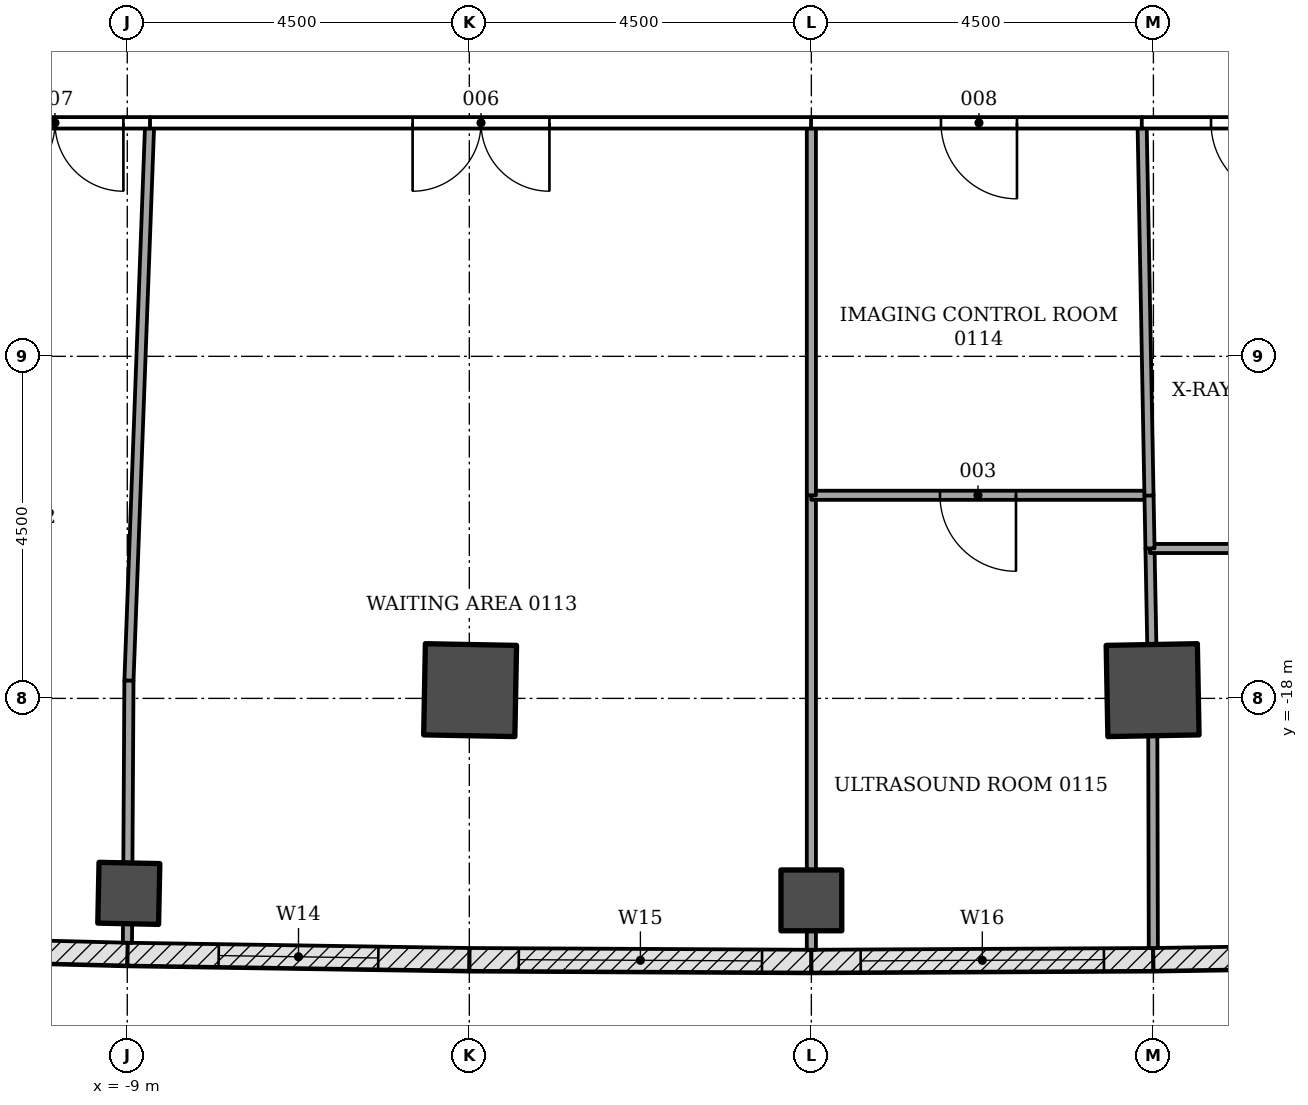
"""IFC4 building model, lengths in metres.
Left out: names, types, materials, properties, quantities, classifications, styles, units other than length and angle.
Written with IfcOpenShell. Run it as: python <this file> out.ifc"""

import sys

from ifc_helpers import new_model, si_unit, direction, frame, frame_2d, origin, origin_2d, place, context, subcontext, project, spatial, rectangle, extrude, element, fill, save


model = new_model("IFC4")
c1 = context("Model", 3, precision=1e-05, world=origin(), true_north=direction((0.0, 1.0)))
c2 = subcontext(c1, "Body", "Model", "MODEL_VIEW")
j1 = project(units=[si_unit("LENGTHUNIT", "METRE"), si_unit("PLANEANGLEUNIT", "RADIAN")], contexts=[c1])
p1 = place(None, origin())
s1 = spatial("IfcSite", under=j1, at=p1, CompositionType="ELEMENT")
p2 = place(p1, origin())
s2 = spatial("IfcBuilding", under=s1, at=p2, CompositionType="ELEMENT")
p3 = place(p2, frame((0.0, 0.0, 6.0)))
s3 = spatial("IfcBuildingStorey", under=s2, at=p3, CompositionType="ELEMENT", Elevation=6.0)
for number, where, z_axis, x_axis in (
    (1, (-4.49, -17.892, -0.25), (0.0, 0.0, 1.0), (-0.019, -1.0, 0.0)),
    (2, (4.49, -17.892, -0.25), (0.0, 0.0, 1.0), (0.019, -1.0, 0.0)),
):
    element("IfcColumn", number, at=place(p3, frame(where, z_axis=z_axis, x_axis=x_axis)), inside=s3, PredefinedType="COLUMN", context=c2, shape_type="SweptSolid", body=[
        extrude(rectangle(XDim=1.2, YDim=1.2, at=origin_2d()), origin(), (0.0, 0.0, 1.0), 4.5),
    ])
for number, where, z_axis, x_axis in (
    (3, (-8.98, -20.565, -0.25), (0.0, 0.0, 1.0), (-0.021, -1.0, 0.0)),
    (4, (0.0, -20.657, -0.25), (0.0, 0.0, 1.0), (0.0, -1.0, 0.0)),
):
    element("IfcColumn", number, at=place(p3, frame(where, z_axis=z_axis, x_axis=x_axis)), inside=s3, PredefinedType="COLUMN", context=c2, shape_type="SweptSolid", body=[
        extrude(rectangle(XDim=0.8, YDim=0.8, at=origin_2d()), origin(), (0.0, 0.0, 1.0), 4.5),
    ])
p4 = place(p3, frame((-9.922, -5.728, -0.25), z_axis=(0.0, 0.0, 1.0), x_axis=(-0.866028046028, -0.499995423472, 0.0)))
e5 = element("IfcWall", 5, at=p4, inside=s3, PredefinedType="SHEAR", context=c2, shape_type="SweptSolid", body=[
    extrude(rectangle(XDim=14.633, YDim=0.9, at=frame_2d((7.316, 0.0))), origin(), (0.0, 0.0, 1.0), 4.5),
])
p5 = place(p4, frame((7.35, 0.0, 0.25)))
e6 = element("IfcOpeningElement", 6, at=p5, cuts=e5, PredefinedType="OPENING", context=c2, shape_type="SweptSolid", body=[
    extrude(rectangle(XDim=1.5, YDim=2.1, at=frame_2d((0.75, 1.05))), frame((0.0, 0.46, 0.0), z_axis=(0.0, -1.0, 0.0), x_axis=(1.0, 0.0, 0.0)), (0.0, 0.0, 1.0), 0.92),
])
p6 = place(p3, frame((-8.998, -21.365, 0.0), z_axis=(0.0, 0.0, 1.0), x_axis=(-0.999671466587, 0.025631209312, 0.0)))
e7 = element("IfcWall", 7, at=p6, inside=s3, PredefinedType="NOTDEFINED", context=c2, shape_type="SweptSolid", body=[
    extrude(rectangle(XDim=4.496, YDim=0.3, at=frame_2d((2.248, 0.0))), origin(), (0.0, 0.0, 1.0), 4.25),
])
p7 = place(p6, frame((1.048, 0.0, 0.9)))
e8 = element("IfcOpeningElement", 8, at=p7, cuts=e7, PredefinedType="OPENING", context=c2, shape_type="SweptSolid", body=[
    extrude(rectangle(XDim=2.4, YDim=2.4, at=frame_2d((1.2, 1.2))), frame((0.0, 0.16, 0.0), z_axis=(0.0, -1.0, 0.0), x_axis=(1.0, 0.0, 0.0)), (0.0, 0.0, 1.0), 0.32),
])
p8 = place(p3, frame((-4.5, -21.434, 0.0), z_axis=(0.0, 0.0, 1.0), x_axis=(-0.999881921814, 0.015366926462, 0.0)))
e9 = element("IfcWall", 9, at=p8, inside=s3, PredefinedType="NOTDEFINED", context=c2, shape_type="SweptSolid", body=[
    extrude(rectangle(XDim=4.496, YDim=0.3, at=frame_2d((2.248, 0.0))), origin(), (0.0, 0.0, 1.0), 4.25),
])
p9 = place(p8, frame((1.198, 0.0, 0.8)))
e10 = element("IfcOpeningElement", 10, at=p9, cuts=e9, PredefinedType="OPENING", context=c2, shape_type="SweptSolid", body=[
    extrude(rectangle(XDim=2.1, YDim=3.0, at=frame_2d((1.05, 1.5))), frame((0.0, 0.16, 0.0), z_axis=(0.0, -1.0, 0.0), x_axis=(1.0, 0.0, 0.0)), (0.0, 0.0, 1.0), 0.32),
])
p10 = place(p3, frame((-0.001, -21.457, 0.0), z_axis=(0.0, 0.0, 1.0), x_axis=(-0.999986693461, 0.005158769258, 0.0)))
e11 = element("IfcWall", 11, at=p10, inside=s3, PredefinedType="NOTDEFINED", context=c2, shape_type="SweptSolid", body=[
    extrude(rectangle(XDim=4.496, YDim=0.3, at=frame_2d((2.248, 0.0))), origin(), (0.0, 0.0, 1.0), 4.25),
])
p11 = place(p10, frame((0.648, 0.0, 0.8)))
e12 = element("IfcOpeningElement", 12, at=p11, cuts=e11, PredefinedType="OPENING", context=c2, shape_type="SweptSolid", body=[
    extrude(rectangle(XDim=3.2, YDim=2.7, at=frame_2d((1.6, 1.35))), frame((0.0, 0.16, 0.0), z_axis=(0.0, -1.0, 0.0), x_axis=(1.0, 0.0, 0.0)), (0.0, 0.0, 1.0), 0.32),
])
p12 = place(p3, frame((4.497, -21.434, 0.0), z_axis=(0.0, 0.0, 1.0), x_axis=(-0.999986693461, -0.005158769258, 0.0)))
e13 = element("IfcWall", 13, at=p12, inside=s3, PredefinedType="NOTDEFINED", context=c2, shape_type="SweptSolid", body=[
    extrude(rectangle(XDim=4.496, YDim=0.3, at=frame_2d((2.248, 0.0))), origin(), (0.0, 0.0, 1.0), 4.25),
])
p13 = place(p12, frame((0.648, 0.0, 0.8)))
e14 = element("IfcOpeningElement", 14, at=p13, cuts=e13, PredefinedType="OPENING", context=c2, shape_type="SweptSolid", body=[
    extrude(rectangle(XDim=3.2, YDim=2.7, at=frame_2d((1.6, 1.35))), frame((0.0, 0.16, 0.0), z_axis=(0.0, -1.0, 0.0), x_axis=(1.0, 0.0, 0.0)), (0.0, 0.0, 1.0), 0.32),
])
p14 = place(p3, frame((8.995, -21.365, 0.0), z_axis=(0.0, 0.0, 1.0), x_axis=(-0.999881921814, -0.015366926462, 0.0)))
e15 = element("IfcWall", 15, at=p14, inside=s3, PredefinedType="NOTDEFINED", context=c2, shape_type="SweptSolid", body=[
    extrude(rectangle(XDim=4.496, YDim=0.3, at=frame_2d((2.248, 0.0))), origin(), (0.0, 0.0, 1.0), 4.25),
])
p15 = place(p14, frame((1.198, 0.0, 0.8)))
e16 = element("IfcOpeningElement", 16, at=p15, cuts=e15, PredefinedType="OPENING", context=c2, shape_type="SweptSolid", body=[
    extrude(rectangle(XDim=2.1, YDim=3.0, at=frame_2d((1.05, 1.5))), frame((0.0, 0.16, 0.0), z_axis=(0.0, -1.0, 0.0), x_axis=(1.0, 0.0, 0.0)), (0.0, 0.0, 1.0), 0.32),
])
p16 = place(p3, frame((4.455, -16.024, 0.0), z_axis=(0.0, 0.0, 1.0), x_axis=(0.018879100933, -0.999821773892, 0.0)))
e17 = element("IfcWall", 17, at=p16, inside=s3, PredefinedType="PARTITIONING", context=c2, shape_type="SweptSolid", body=[
    extrude(rectangle(XDim=1.267, YDim=0.12, at=frame_2d((0.634, 0.0))), origin(), (0.0, 0.0, 1.0), 3.638),
])
p17 = place(p3, frame((4.492, -18.492, 0.0), z_axis=(0.0, 0.0, 1.0), x_axis=(0.002535843543, -0.999996784744, 0.0)))
e18 = element("IfcWall", 18, at=p17, inside=s3, PredefinedType="PARTITIONING", context=c2, shape_type="SweptSolid", body=[
    extrude(rectangle(XDim=2.792, YDim=0.12, at=frame_2d((1.396, 0.0))), origin(), (0.0, 0.0, 1.0), 3.633),
])
p18 = place(p3, frame((8.913, -16.028, 0.0), z_axis=(0.0, 0.0, 1.0), x_axis=(-1.0, 0.0, 0.0)))
e19 = element("IfcWall", 19, at=p18, inside=s3, PredefinedType="PARTITIONING", context=c2, shape_type="SweptSolid", body=[
    extrude(rectangle(XDim=4.458, YDim=0.12, at=frame_2d((2.229, 0.0))), origin(), (0.0, 0.0, 1.0), 3.638),
])
p19 = place(p18, frame((1.75, 0.0, 0.0)))
e20 = element("IfcOpeningElement", 20, at=p19, cuts=e19, PredefinedType="OPENING", context=c2, shape_type="SweptSolid", body=[
    extrude(rectangle(XDim=1.0, YDim=2.1, at=frame_2d((0.5, 1.05))), frame((0.0, 0.07, 0.0), z_axis=(0.0, -1.0, 0.0), x_axis=(1.0, 0.0, 0.0)), (0.0, 0.0, 1.0), 0.14),
])
p20 = place(p3, frame((0.0, -21.057, 0.0), z_axis=(0.0, 0.0, 1.0), x_axis=(0.0, -1.0, 0.0)))
e21 = element("IfcWall", 21, at=p20, inside=s3, PredefinedType="PARTITIONING", context=c2, shape_type="SweptSolid", body=[
    extrude(rectangle(XDim=0.25, YDim=0.12, at=frame_2d((0.125, 0.0))), origin(), (0.0, 0.0, 1.0), 4.25),
])
p21 = place(p3, frame((0.0, -15.324, 0.0), z_axis=(0.0, 0.0, 1.0), x_axis=(0.0, -1.0, 0.0)))
e22 = element("IfcWall", 22, at=p21, inside=s3, PredefinedType="PARTITIONING", context=c2, shape_type="SweptSolid", body=[
    extrude(rectangle(XDim=4.933, YDim=0.12, at=frame_2d((2.467, 0.0))), origin(), (0.0, 0.0, 1.0), 3.638),
])
p22 = place(p3, frame((4.442, -15.328, 0.0), z_axis=(0.0, 0.0, 1.0), x_axis=(-1.0, 0.0, 0.0)))
e23 = element("IfcWall", 23, at=p22, inside=s3, PredefinedType="PARTITIONING", context=c2, shape_type="SweptSolid", body=[
    extrude(rectangle(XDim=4.442, YDim=0.12, at=frame_2d((2.221, 0.0))), origin(), (0.0, 0.0, 1.0), 3.638),
])
p23 = place(p22, frame((1.75, 0.0, 0.0)))
e24 = element("IfcOpeningElement", 24, at=p23, cuts=e23, PredefinedType="OPENING", context=c2, shape_type="SweptSolid", body=[
    extrude(rectangle(XDim=1.0, YDim=2.1, at=frame_2d((0.5, 1.05))), frame((0.0, 0.07, 0.0), z_axis=(0.0, -1.0, 0.0), x_axis=(1.0, 0.0, 0.0)), (0.0, 0.0, 1.0), 0.14),
])
p24 = place(p3, frame((4.455, -16.027, 0.0), z_axis=(0.0, 0.0, 1.0), x_axis=(-0.01874670497, 0.999824265085, 0.0)))
e25 = element("IfcWall", 25, at=p24, inside=s3, PredefinedType="PARTITIONING", context=c2, shape_type="SweptSolid", body=[
    extrude(rectangle(XDim=0.703, YDim=0.12, at=frame_2d((0.352, 0.0))), origin(), (0.0, 0.0, 1.0), 3.638),
])
p25 = place(p3, frame((-8.996, -20.965, 0.0), z_axis=(0.0, 0.0, 1.0), x_axis=(-0.007812261592, -0.999969483819, 0.0)))
e26 = element("IfcWall", 26, at=p25, inside=s3, PredefinedType="PARTITIONING", context=c2, shape_type="SweptSolid", body=[
    extrude(rectangle(XDim=0.25, YDim=0.12, at=frame_2d((0.125, 0.0))), origin(), (0.0, 0.0, 1.0), 4.25),
])
p26 = place(p3, frame((-8.705, -10.429, 0.0), z_axis=(0.0, 0.0, 1.0), x_axis=(-0.037170289837, -0.999308945999, 0.0)))
e27 = element("IfcWall", 27, at=p26, inside=s3, PredefinedType="PARTITIONING", context=c2, shape_type="SweptSolid", body=[
    extrude(rectangle(XDim=7.343, YDim=0.12, at=frame_2d((3.672, 0.0))), origin(), (0.0, 0.0, 1.0), 3.638),
])
p27 = place(p3, frame((-8.978, -17.767, 0.0), z_axis=(0.0, 0.0, 1.0), x_axis=(-0.005803200997, -0.999983161287, 0.0)))
e28 = element("IfcWall", 28, at=p27, inside=s3, PredefinedType="PARTITIONING", context=c2, shape_type="SweptSolid", body=[
    extrude(rectangle(XDim=2.398, YDim=0.12, at=frame_2d((1.199, 0.0))), origin(), (0.0, 0.0, 1.0), 3.638),
])
p28 = place(p3, frame((0.0, -15.328, 0.0), z_axis=(0.0, 0.0, 1.0), x_axis=(0.0, 1.0, 0.0)))
e29 = element("IfcWall", 29, at=p28, inside=s3, PredefinedType="PARTITIONING", context=c2, shape_type="SweptSolid", body=[
    extrude(rectangle(XDim=4.9, YDim=0.12, at=frame_2d((2.45, 0.0))), origin(), (0.0, 0.0, 1.0), 3.638),
])
p29 = place(p3, frame((0.004, -10.428, 0.0), z_axis=(0.0, 0.0, 1.0), x_axis=(-1.0, 0.0, 0.0)))
e30 = element("IfcWall", 30, at=p29, inside=s3, PredefinedType="PARTITIONING", context=c2, shape_type="SweptSolid", body=[
    extrude(rectangle(XDim=8.713, YDim=0.15, at=frame_2d((4.356, 0.0))), origin(), (0.0, 0.0, 1.0), 3.638),
])
p30 = place(p29, frame((3.45, 0.0, 0.0)))
e31 = element("IfcOpeningElement", 31, at=p30, cuts=e30, PredefinedType="OPENING", context=c2, shape_type="SweptSolid", body=[
    extrude(rectangle(XDim=1.8, YDim=2.1, at=frame_2d((0.9, 1.05))), frame((0.0, 0.085, 0.0), z_axis=(0.0, -1.0, 0.0), x_axis=(1.0, 0.0, 0.0)), (0.0, 0.0, 1.0), 0.17),
])
p31 = place(p3, frame((-8.701, -10.428, 0.0), z_axis=(0.0, 0.0, 1.0), x_axis=(-1.0, 0.0, 0.0)))
e32 = element("IfcWall", 32, at=p31, inside=s3, PredefinedType="PARTITIONING", context=c2, shape_type="SweptSolid", body=[
    extrude(rectangle(XDim=2.548, YDim=0.15, at=frame_2d((1.274, 0.0))), origin(), (0.0, 0.0, 1.0), 3.638),
])
p32 = place(p31, frame((0.35, 0.0, 0.0)))
e33 = element("IfcOpeningElement", 33, at=p32, cuts=e32, PredefinedType="OPENING", context=c2, shape_type="SweptSolid", body=[
    extrude(rectangle(XDim=1.8, YDim=2.1, at=frame_2d((0.9, 1.05))), frame((0.0, 0.085, 0.0), z_axis=(0.0, -1.0, 0.0), x_axis=(1.0, 0.0, 0.0)), (0.0, 0.0, 1.0), 0.17),
])
p33 = place(p3, frame((4.442, -15.332, 0.0), z_axis=(0.0, 0.0, 1.0), x_axis=(-0.018519952131, 0.999828490979, 0.0)))
e34 = element("IfcWall", 34, at=p33, inside=s3, PredefinedType="PARTITIONING", context=c2, shape_type="SweptSolid", body=[
    extrude(rectangle(XDim=4.904, YDim=0.12, at=frame_2d((2.452, 0.0))), origin(), (0.0, 0.0, 1.0), 3.638),
])
p34 = place(p3, frame((4.355, -10.428, 0.0), z_axis=(0.0, 0.0, 1.0), x_axis=(-1.0, 0.0, 0.0)))
e35 = element("IfcWall", 35, at=p34, inside=s3, PredefinedType="PARTITIONING", context=c2, shape_type="SweptSolid", body=[
    extrude(rectangle(XDim=4.359, YDim=0.15, at=frame_2d((2.179, 0.0))), origin(), (0.0, 0.0, 1.0), 3.638),
])
p35 = place(p34, frame((1.65, 0.0, 0.0)))
e36 = element("IfcOpeningElement", 36, at=p35, cuts=e35, PredefinedType="OPENING", context=c2, shape_type="SweptSolid", body=[
    extrude(rectangle(XDim=1.0, YDim=2.1, at=frame_2d((0.5, 1.05))), frame((0.0, 0.085, 0.0), z_axis=(0.0, -1.0, 0.0), x_axis=(1.0, 0.0, 0.0)), (0.0, 0.0, 1.0), 0.17),
])
p36 = place(p3, frame((7.208, -10.428, 0.0), z_axis=(0.0, 0.0, 1.0), x_axis=(-1.0, 0.0, 0.0)))
e37 = element("IfcWall", 37, at=p36, inside=s3, PredefinedType="PARTITIONING", context=c2, shape_type="SweptSolid", body=[
    extrude(rectangle(XDim=2.861, YDim=0.15, at=frame_2d((1.431, 0.0))), origin(), (0.0, 0.0, 1.0), 3.638),
])
p37 = place(p36, frame((0.95, 0.0, 0.0)))
e38 = element("IfcOpeningElement", 38, at=p37, cuts=e37, PredefinedType="OPENING", context=c2, shape_type="SweptSolid", body=[
    extrude(rectangle(XDim=1.0, YDim=2.1, at=frame_2d((0.5, 1.05))), frame((0.0, 0.085, 0.0), z_axis=(0.0, -1.0, 0.0), x_axis=(1.0, 0.0, 0.0)), (0.0, 0.0, 1.0), 0.17),
])
p38 = place(p9, origin())
e39 = element("IfcWindow", 39, at=p38, inside=s3, PartitioningType="DOUBLE_PANEL_HORIZONTAL", PredefinedType="WINDOW", context=c2, shape_type="SweptSolid", body=[
    extrude(rectangle(XDim=2.1, YDim=3.0, at=frame_2d((1.05, 1.5))), frame((0.0, 0.03, 0.0), z_axis=(0.0, -1.0, 0.0), x_axis=(1.0, 0.0, 0.0)), (0.0, 0.0, 1.0), 0.06),
])
fill(e10, e39)
p39 = place(p11, origin())
e40 = element("IfcWindow", 40, at=p39, inside=s3, PartitioningType="TRIPLE_PANEL_VERTICAL", PredefinedType="WINDOW", context=c2, shape_type="SweptSolid", body=[
    extrude(rectangle(XDim=3.2, YDim=2.7, at=frame_2d((1.6, 1.35))), frame((0.0, 0.03, 0.0), z_axis=(0.0, -1.0, 0.0), x_axis=(1.0, 0.0, 0.0)), (0.0, 0.0, 1.0), 0.06),
])
fill(e12, e40)
p40 = place(p13, origin())
e41 = element("IfcWindow", 41, at=p40, inside=s3, PartitioningType="TRIPLE_PANEL_VERTICAL", PredefinedType="WINDOW", context=c2, shape_type="SweptSolid", body=[
    extrude(rectangle(XDim=3.2, YDim=2.7, at=frame_2d((1.6, 1.35))), frame((0.0, 0.03, 0.0), z_axis=(0.0, -1.0, 0.0), x_axis=(1.0, 0.0, 0.0)), (0.0, 0.0, 1.0), 0.06),
])
fill(e14, e41)
p41 = place(p23, origin())
e42 = element("IfcDoor", 42, at=p41, inside=s3, OperationType="SINGLE_SWING_RIGHT", PredefinedType="DOOR", context=c2, shape_type="SweptSolid", body=[
    extrude(rectangle(XDim=1.0, YDim=2.1, at=frame_2d((0.5, 1.05))), frame((0.0, 0.025, 0.0), z_axis=(0.0, -1.0, 0.0), x_axis=(1.0, 0.0, 0.0)), (0.0, 0.0, 1.0), 0.05),
])
fill(e24, e42)
p42 = place(p30, origin())
e43 = element("IfcDoor", 43, at=p42, inside=s3, OperationType="DOUBLE_DOOR_SINGLE_SWING", PredefinedType="DOOR", context=c2, shape_type="SweptSolid", body=[
    extrude(rectangle(XDim=1.8, YDim=2.1, at=frame_2d((0.9, 1.05))), frame((0.0, 0.025, 0.0), z_axis=(0.0, -1.0, 0.0), x_axis=(1.0, 0.0, 0.0)), (0.0, 0.0, 1.0), 0.05),
])
fill(e31, e43)
p43 = place(p32, origin())
e44 = element("IfcDoor", 44, at=p43, inside=s3, OperationType="DOUBLE_DOOR_SINGLE_SWING", PredefinedType="DOOR", context=c2, shape_type="SweptSolid", body=[
    extrude(rectangle(XDim=1.8, YDim=2.1, at=frame_2d((0.9, 1.05))), frame((0.0, 0.025, 0.0), z_axis=(0.0, -1.0, 0.0), x_axis=(1.0, 0.0, 0.0)), (0.0, 0.0, 1.0), 0.05),
])
fill(e33, e44)
p44 = place(p35, origin())
e45 = element("IfcDoor", 45, at=p44, inside=s3, OperationType="SINGLE_SWING_LEFT", PredefinedType="DOOR", context=c2, shape_type="SweptSolid", body=[
    extrude(rectangle(XDim=1.0, YDim=2.1, at=frame_2d((0.5, 1.05))), frame((0.0, 0.025, 0.0), z_axis=(0.0, -1.0, 0.0), x_axis=(1.0, 0.0, 0.0)), (0.0, 0.0, 1.0), 0.05),
])
fill(e36, e45)
p45 = place(p37, origin())
e46 = element("IfcDoor", 46, at=p45, inside=s3, OperationType="SINGLE_SWING_RIGHT", PredefinedType="DOOR", context=c2, shape_type="SweptSolid", body=[
    extrude(rectangle(XDim=1.0, YDim=2.1, at=frame_2d((0.5, 1.05))), frame((0.0, 0.025, 0.0), z_axis=(0.0, -1.0, 0.0), x_axis=(1.0, 0.0, 0.0)), (0.0, 0.0, 1.0), 0.05),
])
fill(e38, e46)
save(model, sys.argv[1])
